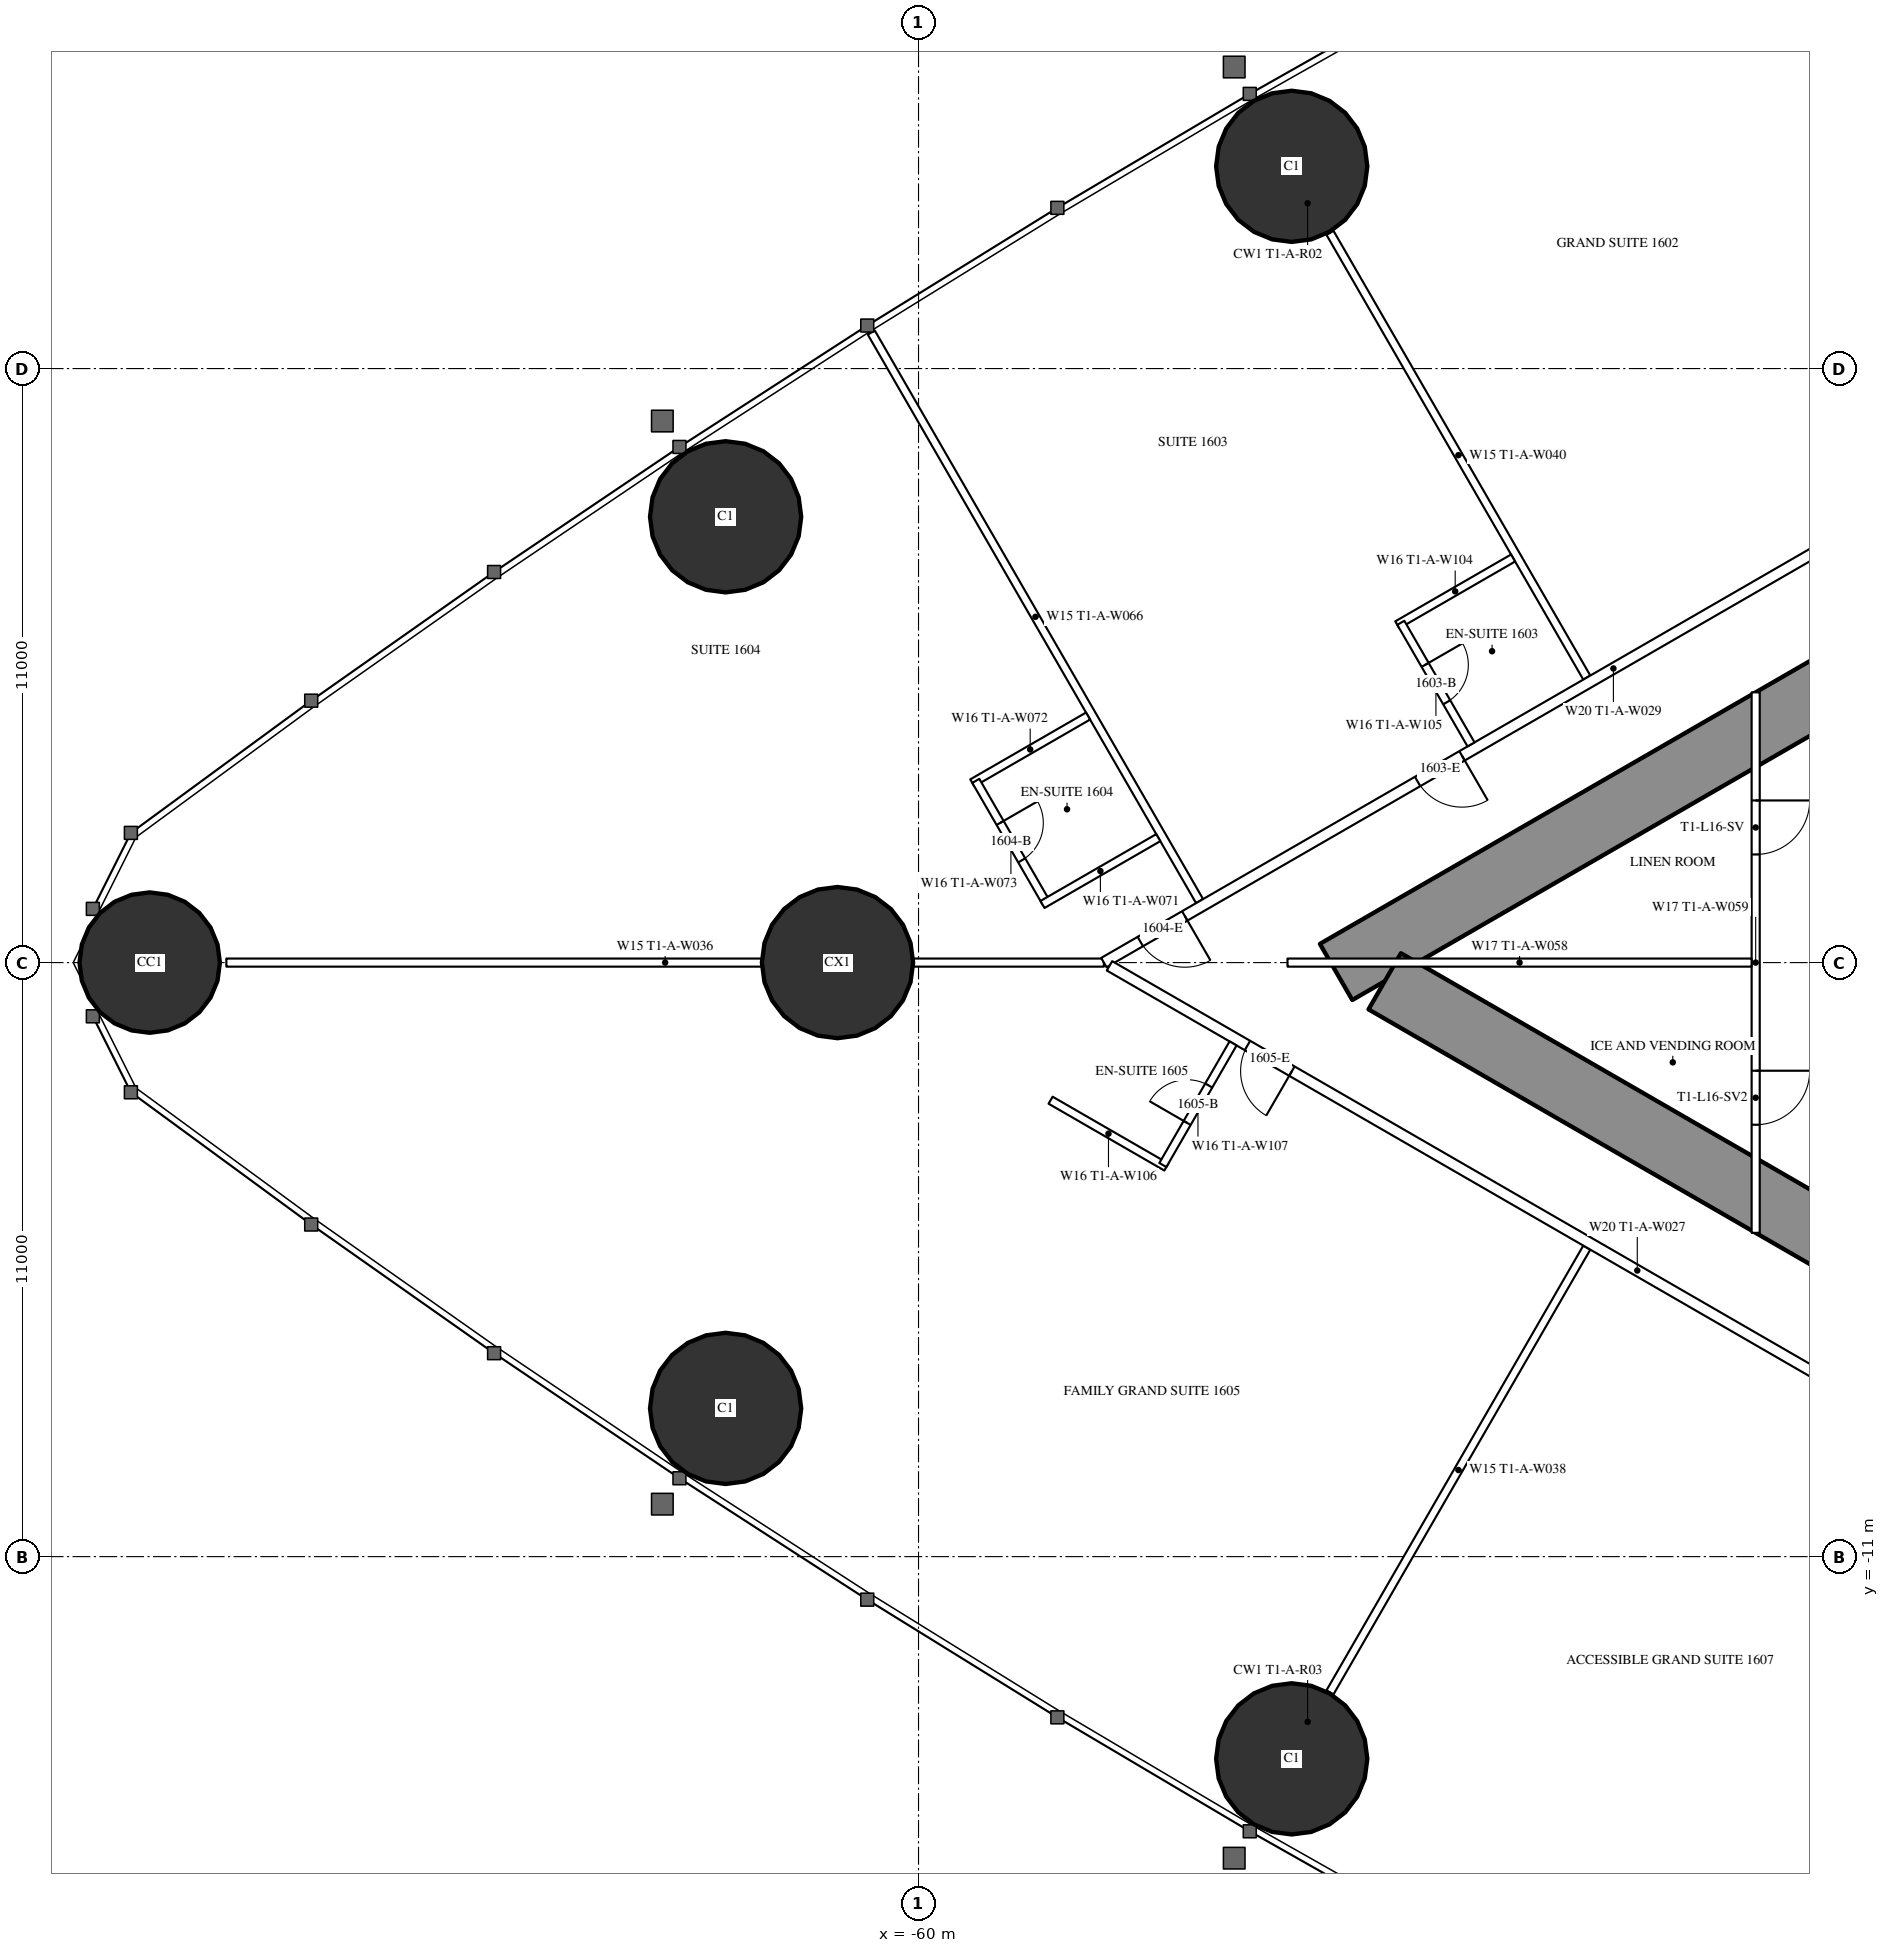
"""IFC4 building model, lengths in metres.
Left out: names, types, materials, properties, quantities, classifications, styles, units other than length and angle.
Written with IfcOpenShell. Run it as: python <this file> out.ifc"""

import sys

from ifc_helpers import new_model, si_unit, direction, frame, frame_2d, origin, origin_2d, place, context, subcontext, project, spatial, rectangle, hollow_circle, extrude, element, fill, save


model = new_model("IFC4")
c1 = context("Model", 3, precision=1e-05, world=origin(), true_north=direction((0.0, 1.0)))
c2 = subcontext(c1, "Body", "Model", "MODEL_VIEW")
j1 = project(units=[si_unit("LENGTHUNIT", "METRE"), si_unit("PLANEANGLEUNIT", "RADIAN")], contexts=[c1])
p1 = place(None, origin())
s1 = spatial("IfcSite", under=j1, at=p1, CompositionType="ELEMENT")
p2 = place(p1, origin())
s2 = spatial("IfcBuilding", under=s1, at=p2, CompositionType="ELEMENT")
p3 = place(p2, frame((0.0, 0.0, 63.5)))
s3 = spatial("IfcBuildingStorey", under=s2, at=p3, CompositionType="ELEMENT", Elevation=63.5)
p4 = place(p3, frame((-74.235, 0.0, 0.0), z_axis=(0.0, 0.0, 1.0), x_axis=(1.0, 0.0, 0.0)))
e1 = element("IfcColumn", 1, at=p4, inside=s3, PredefinedType="COLUMN", context=c2, shape_type="SweptSolid", body=[
    extrude(hollow_circle(Radius=1.3, WallThickness=0.1, at=origin_2d()), origin(), (0.0, 0.0, 1.0), 3.5),
])
for number, where, z_axis, x_axis in (
    (2, (-63.572, -8.255, 0.0), (0.0, 0.0, 1.0), (1.0, 0.0, 0.0)),
    (3, (-53.09, -14.745, 0.0), (0.0, 0.0, 1.0), (1.0, 0.0, 0.0)),
    (4, (-53.09, 14.745, 0.0), (0.0, 0.0, 1.0), (1.0, 0.0, 0.0)),
    (5, (-63.572, 8.255, 0.0), (0.0, 0.0, 1.0), (1.0, 0.0, 0.0)),
):
    element("IfcColumn", number, at=place(p3, frame(where, z_axis=z_axis, x_axis=x_axis)), inside=s3, PredefinedType="COLUMN", context=c2, shape_type="SweptSolid", body=[
        extrude(hollow_circle(Radius=1.4, WallThickness=0.12, at=origin_2d()), origin(), (0.0, 0.0, 1.0), 3.5),
    ])
p5 = place(p3, frame((-61.5, 0.0, 0.0), z_axis=(0.0, 0.0, 1.0), x_axis=(1.0, 0.0, 0.0)))
e6 = element("IfcColumn", 6, at=p5, inside=s3, PredefinedType="COLUMN", context=c2, shape_type="SweptSolid", body=[
    extrude(hollow_circle(Radius=1.4, WallThickness=0.1, at=origin_2d()), origin(), (0.0, 0.0, 1.0), 3.5),
])
p6 = place(p3, frame((-27.2, 14.3, 0.0), z_axis=(0.0, 0.0, 1.0), x_axis=(-0.866026593062, -0.499997940104, 0.0)))
e7 = element("IfcWall", 7, at=p6, inside=s3, PredefinedType="SHEAR", context=c2, shape_type="SweptSolid", body=[
    extrude(rectangle(XDim=28.946, YDim=1.2, at=frame_2d((14.473, 0.0))), origin(), (0.0, 0.0, 1.0), 3.5),
])
p7 = place(p6, frame((4.6, 0.0, 0.0)))
e8 = element("IfcOpeningElement", 8, at=p7, cuts=e7, PredefinedType="OPENING", context=c2, shape_type="SweptSolid", body=[
    extrude(rectangle(XDim=1.0, YDim=2.2, at=frame_2d((0.5, 1.1))), frame((0.0, 0.61, 0.0), z_axis=(0.0, -1.0, 0.0), x_axis=(1.0, 0.0, 0.0)), (0.0, 0.0, 1.0), 1.22),
])
p8 = place(p6, frame((13.395, 0.0, 0.0)))
e9 = element("IfcOpeningElement", 9, at=p8, cuts=e7, PredefinedType="OPENING", context=c2, shape_type="SweptSolid", body=[
    extrude(rectangle(XDim=1.8, YDim=2.2, at=frame_2d((0.9, 1.1))), frame((0.0, 0.61, 0.0), z_axis=(0.0, -1.0, 0.0), x_axis=(1.0, 0.0, 0.0)), (0.0, 0.0, 1.0), 1.22),
])
p9 = place(p3, frame((-27.2, -14.3, 0.0), z_axis=(0.0, 0.0, 1.0), x_axis=(-0.866024021859, 0.500002393557, 0.0)))
e10 = element("IfcWall", 10, at=p9, inside=s3, PredefinedType="SHEAR", context=c2, shape_type="SweptSolid", body=[
    extrude(rectangle(XDim=27.907, YDim=1.2, at=frame_2d((13.954, 0.0))), origin(), (0.0, 0.0, 1.0), 3.5),
])
p10 = place(p9, frame((4.6, 0.0, 0.0)))
e11 = element("IfcOpeningElement", 11, at=p10, cuts=e10, PredefinedType="OPENING", context=c2, shape_type="SweptSolid", body=[
    extrude(rectangle(XDim=1.0, YDim=2.2, at=frame_2d((0.5, 1.1))), frame((0.0, 0.61, 0.0), z_axis=(0.0, -1.0, 0.0), x_axis=(1.0, 0.0, 0.0)), (0.0, 0.0, 1.0), 1.22),
])
p11 = place(p9, frame((13.395, 0.0, 0.0)))
e12 = element("IfcOpeningElement", 12, at=p11, cuts=e10, PredefinedType="OPENING", context=c2, shape_type="SweptSolid", body=[
    extrude(rectangle(XDim=1.8, YDim=2.2, at=frame_2d((0.9, 1.1))), frame((0.0, 0.61, 0.0), z_axis=(0.0, -1.0, 0.0), x_axis=(1.0, 0.0, 0.0)), (0.0, 0.0, 1.0), 1.22),
])
p12 = place(p3, frame((-47.627, 5.278, 0.0), z_axis=(0.0, 0.0, 1.0), x_axis=(-0.500009844318, 0.86601972009, 0.0)))
e13 = element("IfcWall", 13, at=p12, inside=s3, PredefinedType="PARTITIONING", context=c2, shape_type="SweptSolid", body=[
    extrude(rectangle(XDim=9.51, YDim=0.15, at=frame_2d((4.755, 0.0))), origin(), (0.0, 0.0, 1.0), 2.25),
])
p13 = place(p3, frame((-54.796, 1.139, 0.0), z_axis=(0.0, 0.0, 1.0), x_axis=(-0.499998860433, 0.866026061713, 0.0)))
e14 = element("IfcWall", 14, at=p13, inside=s3, PredefinedType="PARTITIONING", context=c2, shape_type="SweptSolid", body=[
    extrude(rectangle(XDim=12.157, YDim=0.15, at=frame_2d((6.078, 0.0))), origin(), (0.0, 0.0, 1.0), 3.25),
])
p14 = place(p3, frame((-47.627, -5.278, 0.0), z_axis=(0.0, 0.0, 1.0), x_axis=(-0.500009844318, -0.86601972009, 0.0)))
e15 = element("IfcWall", 15, at=p14, inside=s3, PredefinedType="PARTITIONING", context=c2, shape_type="SweptSolid", body=[
    extrude(rectangle(XDim=9.51, YDim=0.15, at=frame_2d((4.755, 0.0))), origin(), (0.0, 0.0, 1.0), 2.25),
])
p15 = place(p3, frame((-56.568, 0.0, 0.0), z_axis=(0.0, 0.0, 1.0), x_axis=(-1.0, 0.0, 0.0)))
e16 = element("IfcWall", 16, at=p15, inside=s3, PredefinedType="PARTITIONING", context=c2, shape_type="SweptSolid", body=[
    extrude(rectangle(XDim=16.247, YDim=0.15, at=frame_2d((8.124, 0.0))), origin(), (0.0, 0.0, 1.0), 2.25),
])
p16 = place(p3, frame((-37.7, 10.894, 0.0), z_axis=(0.0, 0.0, 1.0), x_axis=(-0.866027905338, -0.499995667157, 0.0)))
e17 = element("IfcWall", 17, at=p16, inside=s3, PredefinedType="PARTITIONING", context=c2, shape_type="SweptSolid", body=[
    extrude(rectangle(XDim=21.787, YDim=0.2, at=frame_2d((10.894, 0.0))), origin(), (0.0, 0.0, 1.0), 3.25),
])
p17 = place(p16, frame((14.13, 0.0, 0.0)))
e18 = element("IfcOpeningElement", 18, at=p17, cuts=e17, PredefinedType="OPENING", context=c2, shape_type="SweptSolid", body=[
    extrude(rectangle(XDim=0.95, YDim=2.2, at=frame_2d((0.475, 1.1))), frame((0.0, 0.11, 0.0), z_axis=(0.0, -1.0, 0.0), x_axis=(1.0, 0.0, 0.0)), (0.0, 0.0, 1.0), 0.22),
])
p18 = place(p16, frame((20.058, 0.0, 0.0)))
e19 = element("IfcOpeningElement", 19, at=p18, cuts=e17, PredefinedType="OPENING", context=c2, shape_type="SweptSolid", body=[
    extrude(rectangle(XDim=0.95, YDim=2.2, at=frame_2d((0.475, 1.1))), frame((0.0, 0.11, 0.0), z_axis=(0.0, -1.0, 0.0), x_axis=(1.0, 0.0, 0.0)), (0.0, 0.0, 1.0), 0.22),
])
p19 = place(p16, frame((0.6, 0.0, 0.0)))
e20 = element("IfcOpeningElement", 20, at=p19, cuts=e17, PredefinedType="OPENING", context=c2, shape_type="SweptSolid", body=[
    extrude(rectangle(XDim=0.95, YDim=2.2, at=frame_2d((0.475, 1.1))), frame((0.0, 0.11, 0.0), z_axis=(0.0, -1.0, 0.0), x_axis=(1.0, 0.0, 0.0)), (0.0, 0.0, 1.0), 0.22),
])
p20 = place(p3, frame((-36.92, -11.344, 0.0), z_axis=(0.0, 0.0, 1.0), x_axis=(-0.866028313256, 0.499994960614, 0.0)))
e21 = element("IfcWall", 21, at=p20, inside=s3, PredefinedType="PARTITIONING", context=c2, shape_type="SweptSolid", body=[
    extrude(rectangle(XDim=22.568, YDim=0.2, at=frame_2d((11.284, 0.0))), origin(), (0.0, 0.0, 1.0), 3.25),
])
p21 = place(p20, frame((18.668, 0.0, 0.0)))
e22 = element("IfcOpeningElement", 22, at=p21, cuts=e21, PredefinedType="OPENING", context=c2, shape_type="SweptSolid", body=[
    extrude(rectangle(XDim=0.95, YDim=2.2, at=frame_2d((0.475, 1.1))), frame((0.0, 0.11, 0.0), z_axis=(0.0, -1.0, 0.0), x_axis=(1.0, 0.0, 0.0)), (0.0, 0.0, 1.0), 0.22),
])
p22 = place(p20, frame((3.35, 0.0, 0.0)))
e23 = element("IfcOpeningElement", 23, at=p22, cuts=e21, PredefinedType="OPENING", context=c2, shape_type="SweptSolid", body=[
    extrude(rectangle(XDim=1.0, YDim=2.2, at=frame_2d((0.5, 1.1))), frame((0.0, 0.11, 0.0), z_axis=(0.0, -1.0, 0.0), x_axis=(1.0, 0.0, 0.0)), (0.0, 0.0, 1.0), 0.22),
])
p23 = place(p3, frame((-48.992, 7.492, 0.0), z_axis=(0.0, 0.0, 1.0), x_axis=(-0.866031185235, -0.4999899861, 0.0)))
e24 = element("IfcWall", 24, at=p23, inside=s3, PredefinedType="PARTITIONING", context=c2, shape_type="SweptSolid", body=[
    extrude(rectangle(XDim=2.475, YDim=0.15, at=frame_2d((1.238, 0.0))), origin(), (0.0, 0.0, 1.0), 3.25),
])
p24 = place(p3, frame((-49.77, 4.04, 0.0), z_axis=(0.0, 0.0, 1.0), x_axis=(-0.500006934395, 0.866021400173, 0.0)))
e25 = element("IfcWall", 25, at=p24, inside=s3, PredefinedType="PARTITIONING", context=c2, shape_type="SweptSolid", body=[
    extrude(rectangle(XDim=2.6, YDim=0.15, at=frame_2d((1.3, 0.0))), origin(), (0.0, 0.0, 1.0), 3.25),
])
p25 = place(p24, frame((0.9, 0.0, 0.0)))
e26 = element("IfcOpeningElement", 26, at=p25, cuts=e25, PredefinedType="OPENING", context=c2, shape_type="SweptSolid", body=[
    extrude(rectangle(XDim=0.8, YDim=2.2, at=frame_2d((0.4, 1.1))), frame((0.0, 0.085, 0.0), z_axis=(0.0, -1.0, 0.0), x_axis=(1.0, 0.0, 0.0)), (0.0, 0.0, 1.0), 0.17),
])
p26 = place(p3, frame((-56.861, 4.565, 0.0), z_axis=(0.0, 0.0, 1.0), x_axis=(-0.86604923931, -0.499958713387, 0.0)))
e27 = element("IfcWall", 27, at=p26, inside=s3, PredefinedType="PARTITIONING", context=c2, shape_type="SweptSolid", body=[
    extrude(rectangle(XDim=2.475, YDim=0.15, at=frame_2d((1.237, 0.0))), origin(), (0.0, 0.0, 1.0), 3.25),
])
p27 = place(p3, frame((-57.639, 1.114, 0.0), z_axis=(0.0, 0.0, 1.0), x_axis=(-0.500006934395, 0.866021400173, 0.0)))
e28 = element("IfcWall", 28, at=p27, inside=s3, PredefinedType="PARTITIONING", context=c2, shape_type="SweptSolid", body=[
    extrude(rectangle(XDim=2.6, YDim=0.15, at=frame_2d((1.3, 0.0))), origin(), (0.0, 0.0, 1.0), 3.25),
])
p28 = place(p27, frame((0.9, 0.0, 0.0)))
e29 = element("IfcOpeningElement", 29, at=p28, cuts=e28, PredefinedType="OPENING", context=c2, shape_type="SweptSolid", body=[
    extrude(rectangle(XDim=0.8, YDim=2.2, at=frame_2d((0.4, 1.1))), frame((0.0, 0.085, 0.0), z_axis=(0.0, -1.0, 0.0), x_axis=(1.0, 0.0, 0.0)), (0.0, 0.0, 1.0), 0.17),
])
for number, where, z_axis, x_axis in (
    (30, (-55.561, 2.313, 0.0), (0.0, 0.0, 1.0), (-0.866, -0.5, 0.0)),
    (31, (-55.411, -3.786, 0.0), (0.0, 0.0, 1.0), (-0.866, 0.5, 0.0)),
):
    element("IfcWall", number, at=place(p3, frame(where, z_axis=z_axis, x_axis=x_axis)), inside=s3, PredefinedType="PARTITIONING", context=c2, shape_type="SweptSolid", body=[
        extrude(rectangle(XDim=2.475, YDim=0.15, at=frame_2d((1.237, 0.0))), origin(), (0.0, 0.0, 1.0), 3.25),
    ])
p29 = place(p3, frame((-54.176, -1.497, 0.0), z_axis=(0.0, 0.0, 1.0), x_axis=(-0.500006934395, -0.866021400173, 0.0)))
e32 = element("IfcWall", 32, at=p29, inside=s3, PredefinedType="PARTITIONING", context=c2, shape_type="SweptSolid", body=[
    extrude(rectangle(XDim=2.6, YDim=0.15, at=frame_2d((1.3, 0.0))), origin(), (0.0, 0.0, 1.0), 3.25),
])
p30 = place(p29, frame((0.9, 0.0, 0.0)))
e33 = element("IfcOpeningElement", 33, at=p30, cuts=e32, PredefinedType="OPENING", context=c2, shape_type="SweptSolid", body=[
    extrude(rectangle(XDim=0.8, YDim=2.2, at=frame_2d((0.4, 1.1))), frame((0.0, 0.085, 0.0), z_axis=(0.0, -1.0, 0.0), x_axis=(1.0, 0.0, 0.0)), (0.0, 0.0, 1.0), 0.17),
])
p31 = place(p3, frame((-44.5, 5.005, 0.0), z_axis=(0.0, 0.0, 1.0), x_axis=(0.0, -1.0, 0.0)))
e34 = element("IfcWall", 34, at=p31, inside=s3, PredefinedType="PARTITIONING", context=c2, shape_type="SweptSolid", body=[
    extrude(rectangle(XDim=10.009, YDim=0.15, at=frame_2d((5.005, 0.0))), origin(), (0.0, 0.0, 1.0), 2.45),
])
p32 = place(p31, frame((2.002, 0.0, 0.0)))
e35 = element("IfcOpeningElement", 35, at=p32, cuts=e34, PredefinedType="OPENING", context=c2, shape_type="SweptSolid", body=[
    extrude(rectangle(XDim=1.0, YDim=2.2, at=frame_2d((0.5, 1.1))), frame((0.0, 0.085, 0.0), z_axis=(0.0, -1.0, 0.0), x_axis=(1.0, 0.0, 0.0)), (0.0, 0.0, 1.0), 0.17),
])
p33 = place(p31, frame((7.007, 0.0, 0.0)))
e36 = element("IfcOpeningElement", 36, at=p33, cuts=e34, PredefinedType="OPENING", context=c2, shape_type="SweptSolid", body=[
    extrude(rectangle(XDim=1.0, YDim=2.2, at=frame_2d((0.5, 1.1))), frame((0.0, 0.085, 0.0), z_axis=(0.0, -1.0, 0.0), x_axis=(1.0, 0.0, 0.0)), (0.0, 0.0, 1.0), 0.17),
])
p34 = place(p3, frame((-44.575, 0.0, 0.0), z_axis=(0.0, 0.0, 1.0), x_axis=(-1.0, 0.0, 0.0)))
e37 = element("IfcWall", 37, at=p34, inside=s3, PredefinedType="PARTITIONING", context=c2, shape_type="SweptSolid", body=[
    extrude(rectangle(XDim=8.593, YDim=0.15, at=frame_2d((4.297, 0.0))), origin(), (0.0, 0.0, 1.0), 2.25),
])
p35 = place(p25, origin())
e38 = element("IfcDoor", 38, at=p35, inside=s3, OperationType="SINGLE_SWING_RIGHT", PredefinedType="DOOR", context=c2, shape_type="SweptSolid", body=[
    extrude(rectangle(XDim=0.8, YDim=2.2, at=frame_2d((0.4, 1.1))), frame((0.0, 0.025, 0.0), z_axis=(0.0, -1.0, 0.0), x_axis=(1.0, 0.0, 0.0)), (0.0, 0.0, 1.0), 0.05),
])
fill(e26, e38)
p36 = place(p17, origin())
e39 = element("IfcDoor", 39, at=p36, inside=s3, OperationType="SINGLE_SWING_LEFT", PredefinedType="DOOR", context=c2, shape_type="SweptSolid", body=[
    extrude(rectangle(XDim=0.95, YDim=2.2, at=frame_2d((0.475, 1.1))), frame((0.0, 0.025, 0.0), z_axis=(0.0, -1.0, 0.0), x_axis=(1.0, 0.0, 0.0)), (0.0, 0.0, 1.0), 0.05),
])
fill(e18, e39)
p37 = place(p28, origin())
e40 = element("IfcDoor", 40, at=p37, inside=s3, OperationType="SINGLE_SWING_RIGHT", PredefinedType="DOOR", context=c2, shape_type="SweptSolid", body=[
    extrude(rectangle(XDim=0.8, YDim=2.2, at=frame_2d((0.4, 1.1))), frame((0.0, 0.025, 0.0), z_axis=(0.0, -1.0, 0.0), x_axis=(1.0, 0.0, 0.0)), (0.0, 0.0, 1.0), 0.05),
])
fill(e29, e40)
p38 = place(p18, origin())
e41 = element("IfcDoor", 41, at=p38, inside=s3, OperationType="SINGLE_SWING_LEFT", PredefinedType="DOOR", context=c2, shape_type="SweptSolid", body=[
    extrude(rectangle(XDim=0.95, YDim=2.2, at=frame_2d((0.475, 1.1))), frame((0.0, 0.025, 0.0), z_axis=(0.0, -1.0, 0.0), x_axis=(1.0, 0.0, 0.0)), (0.0, 0.0, 1.0), 0.05),
])
fill(e19, e41)
p39 = place(p30, origin())
e42 = element("IfcDoor", 42, at=p39, inside=s3, OperationType="SINGLE_SWING_RIGHT", PredefinedType="DOOR", context=c2, shape_type="SweptSolid", body=[
    extrude(rectangle(XDim=0.8, YDim=2.2, at=frame_2d((0.4, 1.1))), frame((0.0, 0.025, 0.0), z_axis=(0.0, -1.0, 0.0), x_axis=(1.0, 0.0, 0.0)), (0.0, 0.0, 1.0), 0.05),
])
fill(e33, e42)
p40 = place(p21, origin())
e43 = element("IfcDoor", 43, at=p40, inside=s3, OperationType="SINGLE_SWING_LEFT", PredefinedType="DOOR", context=c2, shape_type="SweptSolid", body=[
    extrude(rectangle(XDim=0.95, YDim=2.2, at=frame_2d((0.475, 1.1))), frame((0.0, 0.025, 0.0), z_axis=(0.0, -1.0, 0.0), x_axis=(1.0, 0.0, 0.0)), (0.0, 0.0, 1.0), 0.05),
])
fill(e22, e43)
p41 = place(p32, origin())
e44 = element("IfcDoor", 44, at=p41, inside=s3, OperationType="SINGLE_SWING_LEFT", PredefinedType="DOOR", context=c2, shape_type="SweptSolid", body=[
    extrude(rectangle(XDim=1.0, YDim=2.2, at=frame_2d((0.5, 1.1))), frame((0.0, 0.025, 0.0), z_axis=(0.0, -1.0, 0.0), x_axis=(1.0, 0.0, 0.0)), (0.0, 0.0, 1.0), 0.05),
])
fill(e35, e44)
p42 = place(p33, origin())
e45 = element("IfcDoor", 45, at=p42, inside=s3, OperationType="SINGLE_SWING_LEFT", PredefinedType="DOOR", context=c2, shape_type="SweptSolid", body=[
    extrude(rectangle(XDim=1.0, YDim=2.2, at=frame_2d((0.5, 1.1))), frame((0.0, 0.025, 0.0), z_axis=(0.0, -1.0, 0.0), x_axis=(1.0, 0.0, 0.0)), (0.0, 0.0, 1.0), 0.05),
])
fill(e36, e45)
save(model, sys.argv[1])
